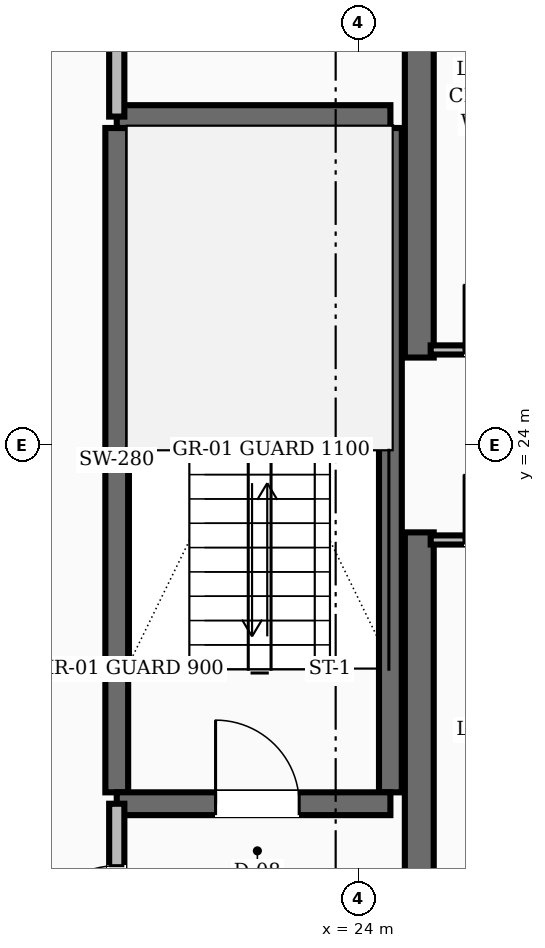
"""IFC4 building model, lengths in metres.
Left out: names, types, materials, properties, quantities, classifications, styles, units other than length and angle.
Written with IfcOpenShell. Run it as: python <this file> out.ifc"""

import sys

from ifc_helpers import new_model, si_unit, direction, frame, frame_2d, origin, place, context, subcontext, project, spatial, rectangle, extrude, element, fill, save


model = new_model("IFC4")
c1 = context("Model", 3, precision=1e-05, world=origin(), true_north=direction((0.0, 1.0)))
c2 = subcontext(c1, "Body", "Model", "MODEL_VIEW")
j1 = project(units=[si_unit("LENGTHUNIT", "METRE"), si_unit("PLANEANGLEUNIT", "RADIAN")], contexts=[c1])
p1 = place(None, origin())
s1 = spatial("IfcSite", under=j1, at=p1, CompositionType="ELEMENT")
p2 = place(p1, origin())
s2 = spatial("IfcBuilding", under=s1, at=p2, CompositionType="ELEMENT")
p3 = place(p2, frame((0.0, 0.0, 80.8)))
s3 = spatial("IfcBuildingStorey", under=s2, at=p3, CompositionType="ELEMENT", Elevation=80.8)
for number, where, z_axis, x_axis in (
    (1, (24.8, 16.55, 0.0), (0.0, 0.0, 1.0), (0.0, 1.0, 0.0)),
    (2, (24.8, 25.15, 0.0), (0.0, 0.0, 1.0), (0.0, 1.0, 0.0)),
):
    element("IfcWall", number, at=place(p3, frame(where, z_axis=z_axis, x_axis=x_axis)), inside=s3, PredefinedType="SHEAR", context=c2, shape_type="SweptSolid", body=[
        extrude(rectangle(XDim=6.3, YDim=0.38, at=frame_2d((3.15, 0.0))), origin(), (0.0, 0.0, 1.0), 3.6),
    ])
for number, where, z_axis, x_axis in (
    (3, (20.82, 19.43, 0.0), (0.0, 0.0, 1.0), (0.0, 1.0, 0.0)),
    (4, (24.42, 19.43, 0.0), (0.0, 0.0, 1.0), (0.0, 1.0, 0.0)),
):
    element("IfcWall", number, at=place(p3, frame(where, z_axis=z_axis, x_axis=x_axis)), inside=s3, PredefinedType="SHEAR", context=c2, shape_type="SweptSolid", body=[
        extrude(rectangle(XDim=8.74, YDim=0.3, at=frame_2d((4.37, 0.0))), origin(), (0.0, 0.0, 1.0), 3.6),
    ])
p4 = place(p3, frame((20.82, 19.28, 0.0), z_axis=(0.0, 0.0, 1.0), x_axis=(1.0, 0.0, 0.0)))
e5 = element("IfcWall", 5, at=p4, inside=s3, PredefinedType="SHEAR", context=c2, shape_type="SweptSolid", body=[
    extrude(rectangle(XDim=3.6, YDim=0.3, at=frame_2d((1.8, 0.0))), origin(), (0.0, 0.0, 1.0), 3.6),
])
p5 = place(p4, frame((1.3, 0.0, 0.0)))
e6 = element("IfcOpeningElement", 6, at=p5, cuts=e5, PredefinedType="OPENING", context=c2, shape_type="SweptSolid", body=[
    extrude(rectangle(XDim=1.1, YDim=2.1, at=frame_2d((0.55, 1.05))), frame((0.0, 0.16, 0.0), z_axis=(0.0, -1.0, 0.0), x_axis=(1.0, 0.0, 0.0)), (0.0, 0.0, 1.0), 0.32),
])
p6 = place(p3, frame((20.82, 28.32, 0.0), z_axis=(0.0, 0.0, 1.0), x_axis=(1.0, 0.0, 0.0)))
e7 = element("IfcWall", 7, at=p6, inside=s3, PredefinedType="SHEAR", context=c2, shape_type="SweptSolid", body=[
    extrude(rectangle(XDim=3.6, YDim=0.3, at=frame_2d((1.8, 0.0))), origin(), (0.0, 0.0, 1.0), 3.6),
])
p7 = place(p3, frame((20.82, 16.55, 0.0), z_axis=(0.0, 0.0, 1.0), x_axis=(0.0, 1.0, 0.0)))
e8 = element("IfcWall", 8, at=p7, inside=s3, PredefinedType="SOLIDWALL", context=c2, shape_type="SweptSolid", body=[
    extrude(rectangle(XDim=2.73, YDim=0.2, at=frame_2d((1.365, 0.0))), origin(), (0.0, 0.0, 1.0), 2.71),
])
p8 = place(p7, frame((0.815, 0.0, 0.0)))
e9 = element("IfcOpeningElement", 9, at=p8, cuts=e8, PredefinedType="OPENING", context=c2, shape_type="SweptSolid", body=[
    extrude(rectangle(XDim=1.1, YDim=2.1, at=frame_2d((0.55, 1.05))), frame((0.0, 0.11, 0.0), z_axis=(0.0, -1.0, 0.0), x_axis=(1.0, 0.0, 0.0)), (0.0, 0.0, 1.0), 0.22),
])
p9 = place(p3, frame((20.82, 28.32, 0.0), z_axis=(0.0, 0.0, 1.0), x_axis=(0.0, 1.0, 0.0)))
e10 = element("IfcWall", 10, at=p9, inside=s3, PredefinedType="SOLIDWALL", context=c2, shape_type="SweptSolid", body=[
    extrude(rectangle(XDim=3.13, YDim=0.2, at=frame_2d((1.565, 0.0))), origin(), (0.0, 0.0, 1.0), 2.71),
])
p10 = place(p9, frame((1.09, 0.0, 0.0)))
e11 = element("IfcOpeningElement", 11, at=p10, cuts=e10, PredefinedType="OPENING", context=c2, shape_type="SweptSolid", body=[
    extrude(rectangle(XDim=0.95, YDim=2.1, at=frame_2d((0.475, 1.05))), frame((0.0, 0.11, 0.0), z_axis=(0.0, -1.0, 0.0), x_axis=(1.0, 0.0, 0.0)), (0.0, 0.0, 1.0), 0.22),
])
p11 = place(p3, frame((24.95, 25.25, 0.0), z_axis=(0.0, 0.0, 1.0), x_axis=(1.0, 0.0, 0.0)))
e12 = element("IfcWall", 12, at=p11, inside=s3, PredefinedType="PARTITIONING", context=c2, shape_type="SweptSolid", body=[
    extrude(rectangle(XDim=3.2, YDim=0.12, at=frame_2d((1.6, 0.0))), origin(), (0.0, 0.0, 1.0), 2.71),
])
p12 = place(p11, frame((0.44, 0.0, 0.0)))
e13 = element("IfcOpeningElement", 13, at=p12, cuts=e12, PredefinedType="OPENING", context=c2, shape_type="SweptSolid", body=[
    extrude(rectangle(XDim=0.86, YDim=2.1, at=frame_2d((0.43, 1.05))), frame((0.0, 0.07, 0.0), z_axis=(0.0, -1.0, 0.0), x_axis=(1.0, 0.0, 0.0)), (0.0, 0.0, 1.0), 0.14),
])
p13 = place(p11, frame((1.9, 0.0, 0.0)))
e14 = element("IfcOpeningElement", 14, at=p13, cuts=e12, PredefinedType="OPENING", context=c2, shape_type="SweptSolid", body=[
    extrude(rectangle(XDim=0.86, YDim=2.1, at=frame_2d((0.43, 1.05))), frame((0.0, 0.07, 0.0), z_axis=(0.0, -1.0, 0.0), x_axis=(1.0, 0.0, 0.0)), (0.0, 0.0, 1.0), 0.14),
])
p14 = place(p3, frame((24.95, 22.75, 0.0), z_axis=(0.0, 0.0, 1.0), x_axis=(1.0, 0.0, 0.0)))
e15 = element("IfcWall", 15, at=p14, inside=s3, PredefinedType="PARTITIONING", context=c2, shape_type="SweptSolid", body=[
    extrude(rectangle(XDim=3.2, YDim=0.12, at=frame_2d((1.6, 0.0))), origin(), (0.0, 0.0, 1.0), 2.71),
])
p15 = place(p14, frame((0.44, 0.0, 0.0)))
e16 = element("IfcOpeningElement", 16, at=p15, cuts=e15, PredefinedType="OPENING", context=c2, shape_type="SweptSolid", body=[
    extrude(rectangle(XDim=0.86, YDim=2.1, at=frame_2d((0.43, 1.05))), frame((0.0, 0.07, 0.0), z_axis=(0.0, -1.0, 0.0), x_axis=(1.0, 0.0, 0.0)), (0.0, 0.0, 1.0), 0.14),
])
p16 = place(p14, frame((1.9, 0.0, 0.0)))
e17 = element("IfcOpeningElement", 17, at=p16, cuts=e15, PredefinedType="OPENING", context=c2, shape_type="SweptSolid", body=[
    extrude(rectangle(XDim=0.86, YDim=2.1, at=frame_2d((0.43, 1.05))), frame((0.0, 0.07, 0.0), z_axis=(0.0, -1.0, 0.0), x_axis=(1.0, 0.0, 0.0)), (0.0, 0.0, 1.0), 0.14),
])
p17 = place(p5, origin())
e18 = element("IfcDoor", 18, at=p17, inside=s3, OperationType="SINGLE_SWING_LEFT", PredefinedType="DOOR", context=c2, shape_type="SweptSolid", body=[
    extrude(rectangle(XDim=1.1, YDim=2.1, at=frame_2d((0.55, 1.05))), frame((0.0, 0.025, 0.0), z_axis=(0.0, -1.0, 0.0), x_axis=(1.0, 0.0, 0.0)), (0.0, 0.0, 1.0), 0.05),
])
fill(e6, e18)
p18 = place(p8, origin())
e19 = element("IfcDoor", 19, at=p18, inside=s3, OperationType="SINGLE_SWING_LEFT", PredefinedType="DOOR", context=c2, shape_type="SweptSolid", body=[
    extrude(rectangle(XDim=1.1, YDim=2.1, at=frame_2d((0.55, 1.05))), frame((0.0, 0.025, 0.0), z_axis=(0.0, -1.0, 0.0), x_axis=(1.0, 0.0, 0.0)), (0.0, 0.0, 1.0), 0.05),
])
fill(e9, e19)
p19 = place(p12, origin())
e20 = element("IfcDoor", 20, at=p19, inside=s3, OperationType="SINGLE_SWING_LEFT", PredefinedType="DOOR", context=c2, shape_type="SweptSolid", body=[
    extrude(rectangle(XDim=0.86, YDim=2.1, at=frame_2d((0.43, 1.05))), frame((0.0, 0.025, 0.0), z_axis=(0.0, -1.0, 0.0), x_axis=(1.0, 0.0, 0.0)), (0.0, 0.0, 1.0), 0.05),
])
fill(e13, e20)
p20 = place(p15, origin())
e21 = element("IfcDoor", 21, at=p20, inside=s3, OperationType="SINGLE_SWING_LEFT", PredefinedType="DOOR", context=c2, shape_type="SweptSolid", body=[
    extrude(rectangle(XDim=0.86, YDim=2.1, at=frame_2d((0.43, 1.05))), frame((0.0, 0.025, 0.0), z_axis=(0.0, -1.0, 0.0), x_axis=(1.0, 0.0, 0.0)), (0.0, 0.0, 1.0), 0.05),
])
fill(e16, e21)
save(model, sys.argv[1])
